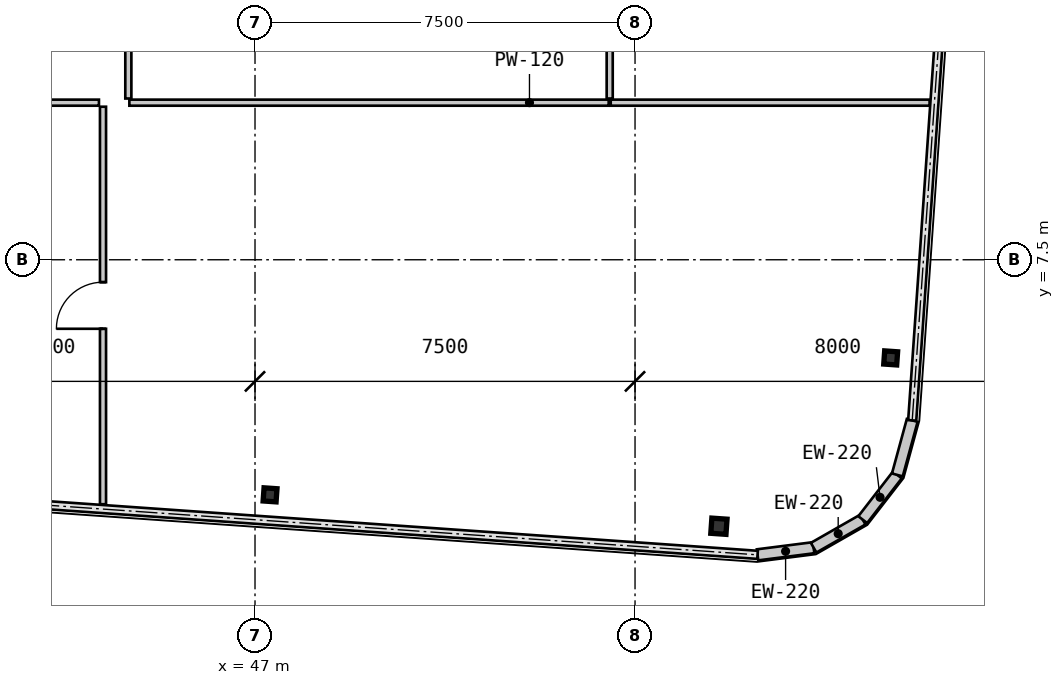
"""IFC4 building model, lengths in metres.
Left out: names, types, materials, properties, quantities, classifications, styles, units other than length and angle.
Written with IfcOpenShell. Run it as: python <this file> out.ifc"""

import sys

from ifc_helpers import new_model, si_unit, direction, frame, frame_2d, origin, origin_2d, place, context, subcontext, project, spatial, rectangle, hollow_rectangle, i_section, extrude, source, transform, mapped, element, fill, save


model = new_model("IFC4")
c1 = context("Model", 3, precision=1e-05, world=origin(), true_north=direction((0.0, 1.0)))
c2 = subcontext(c1, "Body", "Model", "MODEL_VIEW")
j1 = project(units=[si_unit("LENGTHUNIT", "METRE"), si_unit("PLANEANGLEUNIT", "RADIAN")], contexts=[c1])
p1 = place(None, origin())
s1 = spatial("IfcSite", under=j1, at=p1, CompositionType="ELEMENT")
p2 = place(p1, origin())
s2 = spatial("IfcBuilding", under=s1, at=p2, CompositionType="ELEMENT")
p3 = place(p2, frame((0.0, 0.0, 126.7)))
s3 = spatial("IfcBuildingStorey", under=s2, at=p3, CompositionType="ELEMENT", Elevation=126.7)
m1 = source(origin(), c2, "Body", "SweptSolid", [
    extrude(i_section(OverallWidth=0.256, OverallDepth=0.26, WebThickness=0.01, FlangeThickness=0.017, at=origin_2d()), origin(), (0.0, 0.0, 1.0), 3.15),
])
p4 = place(p3, frame((47.297, 2.861, 0.0), z_axis=(0.0, 0.0, 1.0), x_axis=(0.99756405026, -0.069756473744, 0.0)))
e1 = element("IfcColumn", 1, at=p4, inside=s3, PredefinedType="COLUMN", context=c2, shape_type="MappedRepresentation", body=[
    mapped(m1, transform((0.0, 0.0, 0.0), scale=1.0)),
])
m2 = source(origin(), c2, "Body", "SweptSolid", [
    extrude(hollow_rectangle(XDim=0.3, YDim=0.3, WallThickness=0.012, at=origin_2d()), origin(), (0.0, 0.0, 1.0), 3.15),
])
p5 = place(p3, frame((56.156, 2.241, 0.0), z_axis=(0.0, 0.0, 1.0), x_axis=(0.99756405026, -0.069756473744, 0.0)))
e2 = element("IfcColumn", 2, at=p5, inside=s3, PredefinedType="COLUMN", context=c2, shape_type="MappedRepresentation", body=[
    mapped(m2, transform((0.0, 0.0, 0.0), scale=1.0)),
])
p6 = place(p3, frame((59.545, 5.563, 0.0), z_axis=(0.0, 0.0, 1.0), x_axis=(0.99756405026, -0.069756473744, 0.0)))
e3 = element("IfcColumn", 3, at=p6, inside=s3, PredefinedType="COLUMN", context=c2, shape_type="MappedRepresentation", body=[
    mapped(m1, transform((0.0, 0.0, 0.0), scale=1.0)),
])
m3 = source(origin(), c2, "Body", "SweptSolid", [
    extrude(rectangle(XDim=1.116, YDim=0.22, at=frame_2d((0.558, 0.0))), origin(), (0.0, 0.0, 1.0), 2.93),
])
p7 = place(p3, frame((56.918, 1.677, 0.0), z_axis=(0.0, 0.0, 1.0), x_axis=(0.99202678349, 0.126027222605, 0.0)))
e4 = element("IfcWall", 4, at=p7, inside=s3, PredefinedType="SOLIDWALL", context=c2, shape_type="MappedRepresentation", body=[
    mapped(m3, transform((0.0, 0.0, 0.0), scale=1.0)),
])
m4 = source(origin(), c2, "Body", "SweptSolid", [
    extrude(rectangle(XDim=1.116, YDim=0.22, at=frame_2d((0.558, 0.0))), origin(), (0.0, 0.0, 1.0), 2.93),
])
for number, where, z_axis, x_axis in (
    (5, (58.025, 1.817, 0.0), (0.0, 0.0, 1.0), (0.868, 0.496, 0.0)),
    (6, (58.994, 2.371, 0.0), (0.0, 0.0, 1.0), (0.612, 0.791, 0.0)),
    (7, (59.677, 3.254, 0.0), (0.0, 0.0, 1.0), (0.263, 0.965, 0.0)),
):
    element("IfcWall", number, at=place(p3, frame(where, z_axis=z_axis, x_axis=x_axis)), inside=s3, PredefinedType="SOLIDWALL", context=c2, shape_type="MappedRepresentation", body=[
        mapped(m4, transform((0.0, 0.0, 0.0), scale=1.0)),
    ])
m5 = source(origin(), c2, "Body", "SweptSolid", [
    extrude(rectangle(XDim=7.844, YDim=0.12, at=frame_2d((3.922, 0.0))), origin(), (0.0, 0.0, 1.0), 2.93),
])
p8 = place(p3, frame((44.0, 10.52, 0.0), z_axis=(0.0, 0.0, 1.0), x_axis=(0.0, -1.0, 0.0)))
e8 = element("IfcWall", 8, at=p8, inside=s3, PredefinedType="PARTITIONING", context=c2, shape_type="MappedRepresentation", body=[
    mapped(m5, transform((0.0, 0.0, 0.0), scale=1.0)),
])
m6 = source(origin(), c2, "Body", "SweptSolid", [
    extrude(rectangle(XDim=0.92, YDim=2.1, at=frame_2d((0.46, 1.05))), frame((0.0, 0.07, 0.0), z_axis=(0.0, -1.0, 0.0), x_axis=(1.0, 0.0, 0.0)), (0.0, 0.0, 1.0), 0.14),
])
p9 = place(p8, frame((3.462, 0.0, 0.0)))
e9 = element("IfcOpeningElement", 9, at=p9, cuts=e8, PredefinedType="OPENING", context=c2, shape_type="MappedRepresentation", body=[
    mapped(m6, transform((0.0, 0.0, 0.0), scale=1.0)),
])
m7 = source(origin(), c2, "Body", "SweptSolid", [
    extrude(rectangle(XDim=7.7, YDim=0.12, at=frame_2d((3.85, 0.0))), origin(), (0.0, 0.0, 1.0), 2.93),
])
p10 = place(p3, frame((36.22, 10.6, 0.0), z_axis=(0.0, 0.0, 1.0), x_axis=(1.0, 0.0, 0.0)))
e10 = element("IfcWall", 10, at=p10, inside=s3, PredefinedType="PARTITIONING", context=c2, shape_type="MappedRepresentation", body=[
    mapped(m7, transform((0.0, 0.0, 0.0), scale=1.0)),
])
m8 = source(origin(), c2, "Body", "SweptSolid", [
    extrude(rectangle(XDim=9.459, YDim=0.12, at=frame_2d((4.73, 0.0))), origin(), (0.0, 0.0, 1.0), 2.93),
])
p11 = place(p3, frame((44.52, 10.6, 0.0), z_axis=(0.0, 0.0, 1.0), x_axis=(1.0, 0.0, 0.0)))
e11 = element("IfcWall", 11, at=p11, inside=s3, PredefinedType="PARTITIONING", context=c2, shape_type="MappedRepresentation", body=[
    mapped(m8, transform((0.0, 0.0, 0.0), scale=1.0)),
])
m9 = source(origin(), c2, "Body", "SweptSolid", [
    extrude(rectangle(XDim=6.293, YDim=0.12, at=frame_2d((3.146, 0.0))), origin(), (0.0, 0.0, 1.0), 2.93),
])
p12 = place(p3, frame((54.02, 10.6, 0.0), z_axis=(0.0, 0.0, 1.0), x_axis=(1.0, 0.0, 0.0)))
e12 = element("IfcWall", 12, at=p12, inside=s3, PredefinedType="PARTITIONING", context=c2, shape_type="MappedRepresentation", body=[
    mapped(m9, transform((0.0, 0.0, 0.0), scale=1.0)),
])
m10 = source(origin(), c2, "Body", "SweptSolid", [
    extrude(rectangle(XDim=11.036, YDim=0.12, at=frame_2d((5.518, 0.0))), origin(), (0.0, 0.0, 1.0), 2.93),
])
for number, where, z_axis, x_axis in (
    (13, (44.5, 21.718, 0.0), (0.0, 0.0, 1.0), (0.0, -1.0, 0.0)),
    (14, (54.0, 21.718, 0.0), (0.0, 0.0, 1.0), (0.0, -1.0, 0.0)),
):
    element("IfcWall", number, at=place(p3, frame(where, z_axis=z_axis, x_axis=x_axis)), inside=s3, PredefinedType="PARTITIONING", context=c2, shape_type="MappedRepresentation", body=[
        mapped(m10, transform((0.0, 0.0, 0.0), scale=1.0)),
    ])
m11 = source(origin(), c2, "Body", "SweptSolid", [
    extrude(rectangle(XDim=0.92, YDim=2.1, at=frame_2d((0.46, 1.05))), frame((0.0, 0.025, 0.0), z_axis=(0.0, -1.0, 0.0), x_axis=(1.0, 0.0, 0.0)), (0.0, 0.0, 1.0), 0.05),
])
p13 = place(p9, frame((0.92, 0.0, 0.0), z_axis=(0.0, 0.0, 1.0), x_axis=(-1.0, 0.0, 0.0)))
e15 = element("IfcDoor", 15, at=p13, inside=s3, OperationType="SINGLE_SWING_LEFT", PredefinedType="DOOR", context=c2, shape_type="MappedRepresentation", body=[
    mapped(m11, transform((0.0, 0.0, 0.0), scale=1.0)),
])
fill(e9, e15)
save(model, sys.argv[1])
